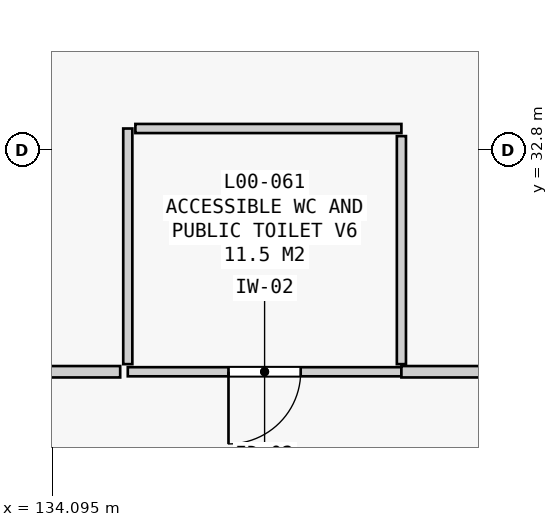
"""IFC4 building model, lengths in metres.
Left out: names, types, materials, properties, quantities, classifications, styles, units other than length and angle.
Written with IfcOpenShell. Run it as: python <this file> out.ifc"""

import sys

from ifc_helpers import new_model, si_unit, direction, frame, frame_2d, origin, place, context, subcontext, project, spatial, rectangle, extrude, element, fill, save


model = new_model("IFC4")
c1 = context("Model", 3, precision=1e-05, world=origin(), true_north=direction((0.0, 1.0)))
c2 = subcontext(c1, "Body", "Model", "MODEL_VIEW")
j1 = project(units=[si_unit("LENGTHUNIT", "METRE"), si_unit("PLANEANGLEUNIT", "RADIAN")], contexts=[c1])
p1 = place(None, origin())
s1 = spatial("IfcSite", under=j1, at=p1, CompositionType="ELEMENT")
p2 = place(p1, origin())
s2 = spatial("IfcBuilding", under=s1, at=p2, CompositionType="ELEMENT")
p3 = place(p2, origin())
s3 = spatial("IfcBuildingStorey", under=s2, at=p3, CompositionType="ELEMENT", Elevation=0.0)
p4 = place(p3, frame((138.69, 29.88, 0.0), z_axis=(0.0, 0.0, 1.0), x_axis=(-1.0, 0.0, 0.0)))
e1 = element("IfcWall", 1, at=p4, inside=s3, PredefinedType="PARTITIONING", context=c2, shape_type="SweptSolid", body=[
    extrude(rectangle(XDim=3.6, YDim=0.12, at=frame_2d((1.8, 0.0))), origin(), (0.0, 0.0, 1.0), 4.67),
])
p5 = place(p4, frame((1.325, 0.0, 0.0)))
e2 = element("IfcOpeningElement", 2, at=p5, cuts=e1, PredefinedType="OPENING", context=c2, shape_type="SweptSolid", body=[
    extrude(rectangle(XDim=0.95, YDim=2.15, at=frame_2d((0.475, 1.075))), frame((0.0, 0.07, 0.0), z_axis=(0.0, -1.0, 0.0), x_axis=(1.0, 0.0, 0.0)), (0.0, 0.0, 1.0), 0.14),
])
p6 = place(p3, frame((135.09, 29.98, 0.0), z_axis=(0.0, 0.0, 1.0), x_axis=(0.0, 1.0, 0.0)))
e3 = element("IfcWall", 3, at=p6, inside=s3, PredefinedType="PARTITIONING", context=c2, shape_type="SweptSolid", body=[
    extrude(rectangle(XDim=3.1, YDim=0.12, at=frame_2d((1.55, 0.0))), origin(), (0.0, 0.0, 1.0), 4.32),
])
p7 = place(p3, frame((135.19, 33.08, 0.0), z_axis=(0.0, 0.0, 1.0), x_axis=(1.0, 0.0, 0.0)))
e4 = element("IfcWall", 4, at=p7, inside=s3, PredefinedType="PARTITIONING", context=c2, shape_type="SweptSolid", body=[
    extrude(rectangle(XDim=3.5, YDim=0.12, at=frame_2d((1.75, 0.0))), origin(), (0.0, 0.0, 1.0), 4.32),
])
p8 = place(p3, frame((138.69, 32.98, 0.0), z_axis=(0.0, 0.0, 1.0), x_axis=(0.0, -1.0, 0.0)))
e5 = element("IfcWall", 5, at=p8, inside=s3, PredefinedType="PARTITIONING", context=c2, shape_type="SweptSolid", body=[
    extrude(rectangle(XDim=3.0, YDim=0.12, at=frame_2d((1.5, 0.0))), origin(), (0.0, 0.0, 1.0), 4.32),
])
p9 = place(p3, frame((134.99, 29.88, 0.0), z_axis=(0.0, 0.0, 1.0), x_axis=(-1.0, 0.0, 0.0)))
e6 = element("IfcWall", 6, at=p9, inside=s3, PredefinedType="PARTITIONING", context=c2, shape_type="SweptSolid", body=[
    extrude(rectangle(XDim=8.625, YDim=0.15, at=frame_2d((4.312, 0.0))), origin(), (0.0, 0.0, 1.0), 4.37),
])
p10 = place(p3, frame((140.05, 29.88, 0.0), z_axis=(0.0, 0.0, 1.0), x_axis=(-1.0, 0.0, 0.0)))
e7 = element("IfcWall", 7, at=p10, inside=s3, PredefinedType="PARTITIONING", context=c2, shape_type="SweptSolid", body=[
    extrude(rectangle(XDim=1.36, YDim=0.15, at=frame_2d((0.68, 0.0))), origin(), (0.0, 0.0, 1.0), 5.14),
])
p11 = place(p5, origin())
e8 = element("IfcDoor", 8, at=p11, inside=s3, OperationType="SINGLE_SWING_RIGHT", PredefinedType="DOOR", context=c2, shape_type="SweptSolid", body=[
    extrude(rectangle(XDim=0.95, YDim=2.15, at=frame_2d((0.475, 1.075))), frame((0.0, 0.025, 0.0), z_axis=(0.0, -1.0, 0.0), x_axis=(1.0, 0.0, 0.0)), (0.0, 0.0, 1.0), 0.05),
])
fill(e2, e8)
save(model, sys.argv[1])
